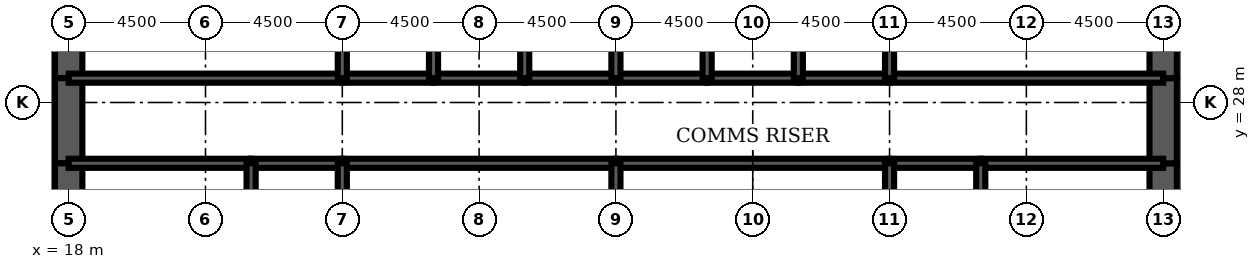
"""IFC4 building model, lengths in metres.
Left out: names, types, materials, properties, quantities, classifications, styles, units other than length and angle.
Written with IfcOpenShell. Run it as: python <this file> out.ifc"""

import sys

from ifc_helpers import new_model, si_unit, direction, frame, frame_2d, origin, place, context, subcontext, project, spatial, rectangle, extrude, element, fill, save


model = new_model("IFC4")
c1 = context("Model", 3, precision=1e-05, world=origin(), true_north=direction((0.0, 1.0)))
c2 = subcontext(c1, "Body", "Model", "MODEL_VIEW")
j1 = project(units=[si_unit("LENGTHUNIT", "METRE"), si_unit("PLANEANGLEUNIT", "RADIAN")], contexts=[c1])
p1 = place(None, origin())
s1 = spatial("IfcSite", under=j1, at=p1, CompositionType="ELEMENT")
p2 = place(p1, origin())
s2 = spatial("IfcBuilding", under=s1, at=p2, CompositionType="ELEMENT")
p3 = place(p2, frame((0.0, 0.0, 155.1)))
s3 = spatial("IfcBuildingStorey", under=s2, at=p3, CompositionType="ELEMENT", Elevation=155.1)
p4 = place(p3, frame((18.0, 32.0, 0.0), z_axis=(0.0, 0.0, 1.0), x_axis=(0.0, -1.0, 0.0)))
e1 = element("IfcWall", 1, at=p4, inside=s3, PredefinedType="SHEAR", context=c2, shape_type="SweptSolid", body=[
    extrude(rectangle(XDim=3.2, YDim=0.9, at=frame_2d((1.6, 0.0))), origin(), (0.0, 0.0, 1.0), 4.2),
])
p5 = place(p3, frame((18.0, 28.8, 0.0), z_axis=(0.0, 0.0, 1.0), x_axis=(0.0, -1.0, 0.0)))
e2 = element("IfcWall", 2, at=p5, inside=s3, PredefinedType="SHEAR", context=c2, shape_type="SweptSolid", body=[
    extrude(rectangle(XDim=2.8, YDim=0.9, at=frame_2d((1.4, 0.0))), origin(), (0.0, 0.0, 1.0), 4.2),
])
p6 = place(p5, frame((0.4, 0.0, 0.0)))
e3 = element("IfcOpeningElement", 3, at=p6, cuts=e2, PredefinedType="OPENING", context=c2, shape_type="SweptSolid", body=[
    extrude(rectangle(XDim=1.8, YDim=2.1, at=frame_2d((0.9, 1.05))), frame((0.0, 0.46, 0.0), z_axis=(0.0, -1.0, 0.0), x_axis=(1.0, 0.0, 0.0)), (0.0, 0.0, 1.0), 0.92),
])
for number, where, z_axis, x_axis in (
    (4, (18.0, 26.0, 0.0), (0.0, 0.0, 1.0), (0.0, -1.0, 0.0)),
    (5, (54.0, 22.0, 0.0), (0.0, 0.0, 1.0), (0.0, 1.0, 0.0)),
):
    element("IfcWall", number, at=place(p3, frame(where, z_axis=z_axis, x_axis=x_axis)), inside=s3, PredefinedType="SHEAR", context=c2, shape_type="SweptSolid", body=[
        extrude(rectangle(XDim=4.0, YDim=0.9, at=frame_2d((2.0, 0.0))), origin(), (0.0, 0.0, 1.0), 4.2),
    ])
p7 = place(p3, frame((54.0, 26.0, 0.0), z_axis=(0.0, 0.0, 1.0), x_axis=(0.0, 1.0, 0.0)))
e6 = element("IfcWall", 6, at=p7, inside=s3, PredefinedType="SHEAR", context=c2, shape_type="SweptSolid", body=[
    extrude(rectangle(XDim=2.8, YDim=0.9, at=frame_2d((1.4, 0.0))), origin(), (0.0, 0.0, 1.0), 4.2),
])
p8 = place(p7, frame((0.6, 0.0, 0.0)))
e7 = element("IfcOpeningElement", 7, at=p8, cuts=e6, PredefinedType="OPENING", context=c2, shape_type="SweptSolid", body=[
    extrude(rectangle(XDim=1.8, YDim=2.1, at=frame_2d((0.9, 1.05))), frame((0.0, 0.46, 0.0), z_axis=(0.0, -1.0, 0.0), x_axis=(1.0, 0.0, 0.0)), (0.0, 0.0, 1.0), 0.92),
])
p9 = place(p3, frame((54.0, 28.8, 0.0), z_axis=(0.0, 0.0, 1.0), x_axis=(0.0, 1.0, 0.0)))
e8 = element("IfcWall", 8, at=p9, inside=s3, PredefinedType="SHEAR", context=c2, shape_type="SweptSolid", body=[
    extrude(rectangle(XDim=3.2, YDim=0.9, at=frame_2d((1.6, 0.0))), origin(), (0.0, 0.0, 1.0), 4.2),
])
p10 = place(p3, frame((18.0, 28.8, 0.0), z_axis=(0.0, 0.0, 1.0), x_axis=(1.0, 0.0, 0.0)))
e9 = element("IfcWall", 9, at=p10, inside=s3, PredefinedType="SOLIDWALL", context=c2, shape_type="SweptSolid", body=[
    extrude(rectangle(XDim=9.0, YDim=0.3, at=frame_2d((4.5, 0.0))), origin(), (0.0, 0.0, 1.0), 4.2),
])
p11 = place(p10, frame((0.65, 0.0, 0.0)))
e10 = element("IfcOpeningElement", 10, at=p11, cuts=e9, PredefinedType="OPENING", context=c2, shape_type="SweptSolid", body=[
    extrude(rectangle(XDim=1.0, YDim=2.1, at=frame_2d((0.5, 1.05))), frame((0.0, 0.16, 0.0), z_axis=(0.0, -1.0, 0.0), x_axis=(1.0, 0.0, 0.0)), (0.0, 0.0, 1.0), 0.32),
])
p12 = place(p3, frame((27.0, 28.8, 0.0), z_axis=(0.0, 0.0, 1.0), x_axis=(1.0, 0.0, 0.0)))
e11 = element("IfcWall", 11, at=p12, inside=s3, PredefinedType="SOLIDWALL", context=c2, shape_type="SweptSolid", body=[
    extrude(rectangle(XDim=3.0, YDim=0.3, at=frame_2d((1.5, 0.0))), origin(), (0.0, 0.0, 1.0), 4.2),
])
p13 = place(p12, frame((0.95, 0.0, 0.0)))
e12 = element("IfcOpeningElement", 12, at=p13, cuts=e11, PredefinedType="OPENING", context=c2, shape_type="SweptSolid", body=[
    extrude(rectangle(XDim=1.1, YDim=2.2, at=frame_2d((0.55, 1.1))), frame((0.0, 0.16, 0.0), z_axis=(0.0, -1.0, 0.0), x_axis=(1.0, 0.0, 0.0)), (0.0, 0.0, 1.0), 0.32),
])
p14 = place(p3, frame((30.0, 28.8, 0.0), z_axis=(0.0, 0.0, 1.0), x_axis=(1.0, 0.0, 0.0)))
e13 = element("IfcWall", 13, at=p14, inside=s3, PredefinedType="SOLIDWALL", context=c2, shape_type="SweptSolid", body=[
    extrude(rectangle(XDim=3.0, YDim=0.3, at=frame_2d((1.5, 0.0))), origin(), (0.0, 0.0, 1.0), 4.2),
])
p15 = place(p14, frame((0.95, 0.0, 0.0)))
e14 = element("IfcOpeningElement", 14, at=p15, cuts=e13, PredefinedType="OPENING", context=c2, shape_type="SweptSolid", body=[
    extrude(rectangle(XDim=1.1, YDim=2.2, at=frame_2d((0.55, 1.1))), frame((0.0, 0.16, 0.0), z_axis=(0.0, -1.0, 0.0), x_axis=(1.0, 0.0, 0.0)), (0.0, 0.0, 1.0), 0.32),
])
p16 = place(p3, frame((33.0, 28.8, 0.0), z_axis=(0.0, 0.0, 1.0), x_axis=(1.0, 0.0, 0.0)))
e15 = element("IfcWall", 15, at=p16, inside=s3, PredefinedType="SOLIDWALL", context=c2, shape_type="SweptSolid", body=[
    extrude(rectangle(XDim=3.0, YDim=0.3, at=frame_2d((1.5, 0.0))), origin(), (0.0, 0.0, 1.0), 4.2),
])
p17 = place(p16, frame((0.95, 0.0, 0.0)))
e16 = element("IfcOpeningElement", 16, at=p17, cuts=e15, PredefinedType="OPENING", context=c2, shape_type="SweptSolid", body=[
    extrude(rectangle(XDim=1.1, YDim=2.2, at=frame_2d((0.55, 1.1))), frame((0.0, 0.16, 0.0), z_axis=(0.0, -1.0, 0.0), x_axis=(1.0, 0.0, 0.0)), (0.0, 0.0, 1.0), 0.32),
])
for number, where, z_axis, x_axis in (
    (17, (36.0, 28.8, 0.0), (0.0, 0.0, 1.0), (1.0, 0.0, 0.0)),
    (18, (39.0, 28.8, 0.0), (0.0, 0.0, 1.0), (1.0, 0.0, 0.0)),
):
    element("IfcWall", number, at=place(p3, frame(where, z_axis=z_axis, x_axis=x_axis)), inside=s3, PredefinedType="SOLIDWALL", context=c2, shape_type="SweptSolid", body=[
        extrude(rectangle(XDim=3.0, YDim=0.3, at=frame_2d((1.5, 0.0))), origin(), (0.0, 0.0, 1.0), 4.2),
    ])
p18 = place(p3, frame((42.0, 28.8, 0.0), z_axis=(0.0, 0.0, 1.0), x_axis=(1.0, 0.0, 0.0)))
e19 = element("IfcWall", 19, at=p18, inside=s3, PredefinedType="SOLIDWALL", context=c2, shape_type="SweptSolid", body=[
    extrude(rectangle(XDim=3.0, YDim=0.3, at=frame_2d((1.5, 0.0))), origin(), (0.0, 0.0, 1.0), 4.2),
])
p19 = place(p18, frame((0.95, 0.0, 0.0)))
e20 = element("IfcOpeningElement", 20, at=p19, cuts=e19, PredefinedType="OPENING", context=c2, shape_type="SweptSolid", body=[
    extrude(rectangle(XDim=1.1, YDim=2.2, at=frame_2d((0.55, 1.1))), frame((0.0, 0.16, 0.0), z_axis=(0.0, -1.0, 0.0), x_axis=(1.0, 0.0, 0.0)), (0.0, 0.0, 1.0), 0.32),
])
p20 = place(p3, frame((45.0, 28.8, 0.0), z_axis=(0.0, 0.0, 1.0), x_axis=(1.0, 0.0, 0.0)))
e21 = element("IfcWall", 21, at=p20, inside=s3, PredefinedType="SOLIDWALL", context=c2, shape_type="SweptSolid", body=[
    extrude(rectangle(XDim=9.0, YDim=0.3, at=frame_2d((4.5, 0.0))), origin(), (0.0, 0.0, 1.0), 4.2),
])
p21 = place(p20, frame((7.35, 0.0, 0.0)))
e22 = element("IfcOpeningElement", 22, at=p21, cuts=e21, PredefinedType="OPENING", context=c2, shape_type="SweptSolid", body=[
    extrude(rectangle(XDim=1.0, YDim=2.1, at=frame_2d((0.5, 1.05))), frame((0.0, 0.16, 0.0), z_axis=(0.0, -1.0, 0.0), x_axis=(1.0, 0.0, 0.0)), (0.0, 0.0, 1.0), 0.32),
])
p22 = place(p3, frame((18.0, 26.0, 0.0), z_axis=(0.0, 0.0, 1.0), x_axis=(1.0, 0.0, 0.0)))
e23 = element("IfcWall", 23, at=p22, inside=s3, PredefinedType="SOLIDWALL", context=c2, shape_type="SweptSolid", body=[
    extrude(rectangle(XDim=6.0, YDim=0.3, at=frame_2d((3.0, 0.0))), origin(), (0.0, 0.0, 1.0), 4.2),
])
p23 = place(p3, frame((24.0, 26.0, 0.0), z_axis=(0.0, 0.0, 1.0), x_axis=(1.0, 0.0, 0.0)))
e24 = element("IfcWall", 24, at=p23, inside=s3, PredefinedType="SOLIDWALL", context=c2, shape_type="SweptSolid", body=[
    extrude(rectangle(XDim=3.0, YDim=0.3, at=frame_2d((1.5, 0.0))), origin(), (0.0, 0.0, 1.0), 4.2),
])
for number, where, z_axis, x_axis in (
    (25, (27.0, 26.0, 0.0), (0.0, 0.0, 1.0), (1.0, 0.0, 0.0)),
    (26, (36.0, 26.0, 0.0), (0.0, 0.0, 1.0), (1.0, 0.0, 0.0)),
):
    element("IfcWall", number, at=place(p3, frame(where, z_axis=z_axis, x_axis=x_axis)), inside=s3, PredefinedType="SOLIDWALL", context=c2, shape_type="SweptSolid", body=[
        extrude(rectangle(XDim=9.0, YDim=0.3, at=frame_2d((4.5, 0.0))), origin(), (0.0, 0.0, 1.0), 4.2),
    ])
p24 = place(p3, frame((45.0, 26.0, 0.0), z_axis=(0.0, 0.0, 1.0), x_axis=(1.0, 0.0, 0.0)))
e27 = element("IfcWall", 27, at=p24, inside=s3, PredefinedType="SOLIDWALL", context=c2, shape_type="SweptSolid", body=[
    extrude(rectangle(XDim=3.0, YDim=0.3, at=frame_2d((1.5, 0.0))), origin(), (0.0, 0.0, 1.0), 4.2),
])
p25 = place(p3, frame((48.0, 26.0, 0.0), z_axis=(0.0, 0.0, 1.0), x_axis=(1.0, 0.0, 0.0)))
e28 = element("IfcWall", 28, at=p25, inside=s3, PredefinedType="SOLIDWALL", context=c2, shape_type="SweptSolid", body=[
    extrude(rectangle(XDim=6.0, YDim=0.3, at=frame_2d((3.0, 0.0))), origin(), (0.0, 0.0, 1.0), 4.2),
])
for number, where, z_axis, x_axis in (
    (29, (27.0, 28.8, 0.0), (0.0, 0.0, 1.0), (0.0, 1.0, 0.0)),
    (30, (30.0, 28.8, 0.0), (0.0, 0.0, 1.0), (0.0, 1.0, 0.0)),
    (31, (33.0, 28.8, 0.0), (0.0, 0.0, 1.0), (0.0, 1.0, 0.0)),
    (32, (36.0, 28.8, 0.0), (0.0, 0.0, 1.0), (0.0, 1.0, 0.0)),
    (33, (39.0, 28.8, 0.0), (0.0, 0.0, 1.0), (0.0, 1.0, 0.0)),
    (34, (42.0, 28.8, 0.0), (0.0, 0.0, 1.0), (0.0, 1.0, 0.0)),
    (35, (45.0, 28.8, 0.0), (0.0, 0.0, 1.0), (0.0, 1.0, 0.0)),
):
    element("IfcWall", number, at=place(p3, frame(where, z_axis=z_axis, x_axis=x_axis)), inside=s3, PredefinedType="SOLIDWALL", context=c2, shape_type="SweptSolid", body=[
        extrude(rectangle(XDim=3.2, YDim=0.3, at=frame_2d((1.6, 0.0))), origin(), (0.0, 0.0, 1.0), 4.2),
    ])
for number, where, z_axis, x_axis in (
    (36, (24.0, 22.0, 0.0), (0.0, 0.0, 1.0), (0.0, 1.0, 0.0)),
    (37, (27.0, 22.0, 0.0), (0.0, 0.0, 1.0), (0.0, 1.0, 0.0)),
    (38, (36.0, 22.0, 0.0), (0.0, 0.0, 1.0), (0.0, 1.0, 0.0)),
    (39, (45.0, 22.0, 0.0), (0.0, 0.0, 1.0), (0.0, 1.0, 0.0)),
    (40, (48.0, 22.0, 0.0), (0.0, 0.0, 1.0), (0.0, 1.0, 0.0)),
):
    element("IfcWall", number, at=place(p3, frame(where, z_axis=z_axis, x_axis=x_axis)), inside=s3, PredefinedType="SOLIDWALL", context=c2, shape_type="SweptSolid", body=[
        extrude(rectangle(XDim=4.0, YDim=0.3, at=frame_2d((2.0, 0.0))), origin(), (0.0, 0.0, 1.0), 4.2),
    ])
p26 = place(p3, frame((38.0, 22.15, 0.0), z_axis=(0.0, 0.0, 1.0), x_axis=(0.0, 1.0, 0.0)))
e41 = element("IfcWall", 41, at=p26, inside=s3, PredefinedType="PARTITIONING", context=c2, shape_type="SweptSolid", body=[
    extrude(rectangle(XDim=3.7, YDim=0.15, at=frame_2d((1.85, 0.0))), origin(), (0.0, 0.0, 1.0), 3.0),
])
p27 = place(p26, frame((2.2, 0.0, 0.0)))
e42 = element("IfcOpeningElement", 42, at=p27, cuts=e41, PredefinedType="OPENING", context=c2, shape_type="SweptSolid", body=[
    extrude(rectangle(XDim=1.0, YDim=2.1, at=frame_2d((0.5, 1.05))), frame((0.0, 0.085, 0.0), z_axis=(0.0, -1.0, 0.0), x_axis=(1.0, 0.0, 0.0)), (0.0, 0.0, 1.0), 0.17),
])
p28 = place(p3, frame((51.375, 22.15, 0.0), z_axis=(0.0, 0.0, 1.0), x_axis=(0.0, 1.0, 0.0)))
e43 = element("IfcWall", 43, at=p28, inside=s3, PredefinedType="PARTITIONING", context=c2, shape_type="SweptSolid", body=[
    extrude(rectangle(XDim=3.7, YDim=0.15, at=frame_2d((1.85, 0.0))), origin(), (0.0, 0.0, 1.0), 3.0),
])
p29 = place(p27, origin())
e44 = element("IfcDoor", 44, at=p29, inside=s3, OperationType="SINGLE_SWING_RIGHT", PredefinedType="DOOR", context=c2, shape_type="SweptSolid", body=[
    extrude(rectangle(XDim=1.0, YDim=2.1, at=frame_2d((0.5, 1.05))), frame((0.0, 0.025, 0.0), z_axis=(0.0, -1.0, 0.0), x_axis=(1.0, 0.0, 0.0)), (0.0, 0.0, 1.0), 0.05),
])
fill(e42, e44)
p30 = place(p19, origin())
e45 = element("IfcDoor", 45, at=p30, inside=s3, OperationType="DOUBLE_DOOR_SLIDING", PredefinedType="USERDEFINED", context=c2, shape_type="SweptSolid", body=[
    extrude(rectangle(XDim=1.1, YDim=2.2, at=frame_2d((0.55, 1.1))), frame((0.0, 0.025, 0.0), z_axis=(0.0, -1.0, 0.0), x_axis=(1.0, 0.0, 0.0)), (0.0, 0.0, 1.0), 0.05),
])
fill(e20, e45)
p31 = place(p13, origin())
e46 = element("IfcDoor", 46, at=p31, inside=s3, OperationType="DOUBLE_DOOR_SLIDING", PredefinedType="USERDEFINED", context=c2, shape_type="SweptSolid", body=[
    extrude(rectangle(XDim=1.1, YDim=2.2, at=frame_2d((0.55, 1.1))), frame((0.0, 0.025, 0.0), z_axis=(0.0, -1.0, 0.0), x_axis=(1.0, 0.0, 0.0)), (0.0, 0.0, 1.0), 0.05),
])
fill(e12, e46)
p32 = place(p15, origin())
e47 = element("IfcDoor", 47, at=p32, inside=s3, OperationType="DOUBLE_DOOR_SLIDING", PredefinedType="USERDEFINED", context=c2, shape_type="SweptSolid", body=[
    extrude(rectangle(XDim=1.1, YDim=2.2, at=frame_2d((0.55, 1.1))), frame((0.0, 0.025, 0.0), z_axis=(0.0, -1.0, 0.0), x_axis=(1.0, 0.0, 0.0)), (0.0, 0.0, 1.0), 0.05),
])
fill(e14, e47)
p33 = place(p17, origin())
e48 = element("IfcDoor", 48, at=p33, inside=s3, OperationType="DOUBLE_DOOR_SLIDING", PredefinedType="USERDEFINED", context=c2, shape_type="SweptSolid", body=[
    extrude(rectangle(XDim=1.1, YDim=2.2, at=frame_2d((0.55, 1.1))), frame((0.0, 0.025, 0.0), z_axis=(0.0, -1.0, 0.0), x_axis=(1.0, 0.0, 0.0)), (0.0, 0.0, 1.0), 0.05),
])
fill(e16, e48)
p34 = place(p11, origin())
e49 = element("IfcDoor", 49, at=p34, inside=s3, OperationType="SINGLE_SWING_LEFT", PredefinedType="DOOR", context=c2, shape_type="SweptSolid", body=[
    extrude(rectangle(XDim=1.0, YDim=2.1, at=frame_2d((0.5, 1.05))), frame((0.0, 0.025, 0.0), z_axis=(0.0, -1.0, 0.0), x_axis=(1.0, 0.0, 0.0)), (0.0, 0.0, 1.0), 0.05),
])
fill(e10, e49)
p35 = place(p21, origin())
e50 = element("IfcDoor", 50, at=p35, inside=s3, OperationType="SINGLE_SWING_RIGHT", PredefinedType="DOOR", context=c2, shape_type="SweptSolid", body=[
    extrude(rectangle(XDim=1.0, YDim=2.1, at=frame_2d((0.5, 1.05))), frame((0.0, 0.025, 0.0), z_axis=(0.0, -1.0, 0.0), x_axis=(1.0, 0.0, 0.0)), (0.0, 0.0, 1.0), 0.05),
])
fill(e22, e50)
p36 = place(p6, origin())
e51 = element("IfcDoor", 51, at=p36, inside=s3, OperationType="SINGLE_SWING_LEFT", PredefinedType="DOOR", context=c2, shape_type="SweptSolid", body=[
    extrude(rectangle(XDim=1.8, YDim=2.1, at=frame_2d((0.9, 1.05))), frame((0.0, 0.45, 0.0), z_axis=(0.0, -1.0, 0.0), x_axis=(1.0, 0.0, 0.0)), (0.0, 0.0, 1.0), 0.899),
])
fill(e3, e51)
p37 = place(p8, origin())
e52 = element("IfcDoor", 52, at=p37, inside=s3, OperationType="SINGLE_SWING_LEFT", PredefinedType="DOOR", context=c2, shape_type="SweptSolid", body=[
    extrude(rectangle(XDim=1.8, YDim=2.1, at=frame_2d((0.9, 1.05))), frame((0.0, 0.45, 0.0), z_axis=(0.0, -1.0, 0.0), x_axis=(1.0, 0.0, 0.0)), (0.0, 0.0, 1.0), 0.899),
])
fill(e7, e52)
save(model, sys.argv[1])
